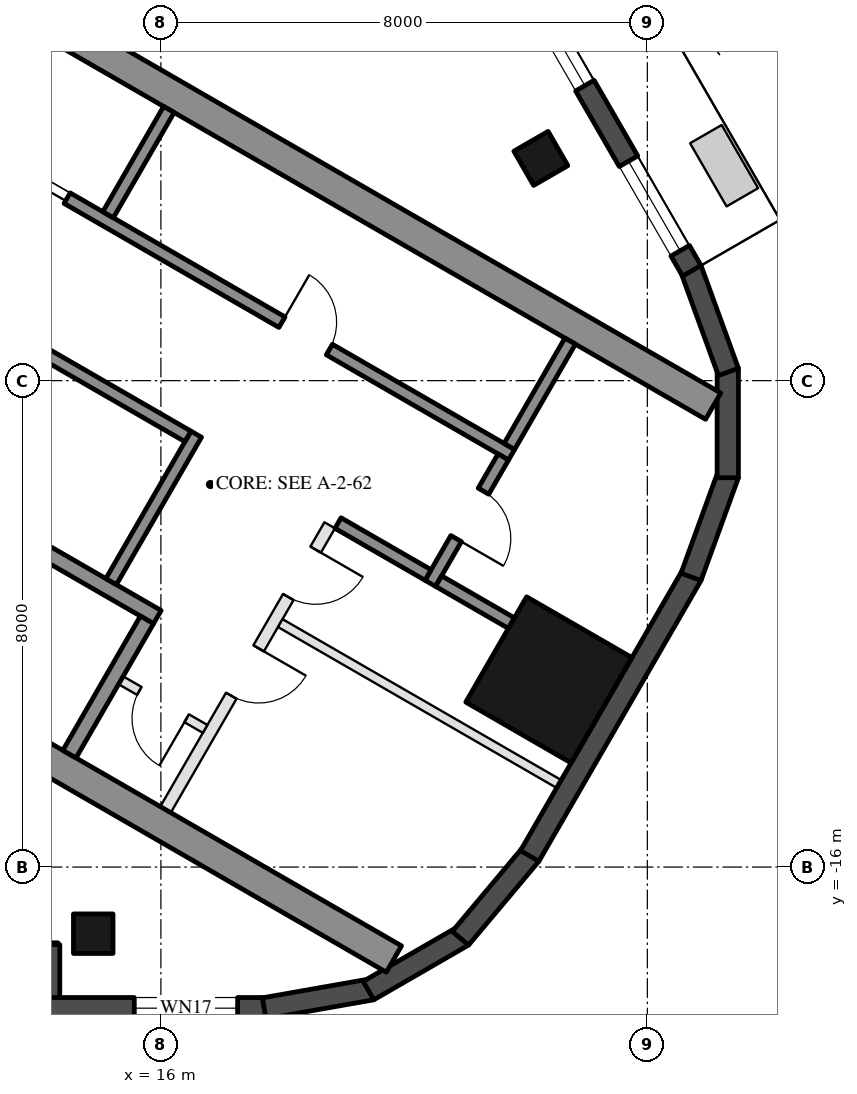
"""IFC4 building model, lengths in metres.
Left out: names, types, materials, properties, quantities, classifications, styles, units other than length and angle.
Written with IfcOpenShell. Run it as: python <this file> out.ifc"""

import sys

from ifc_helpers import new_model, si_unit, direction, frame, frame_2d, origin, origin_2d, place, context, subcontext, project, spatial, rectangle, hollow_rectangle, extrude, boolean, halfspace, element, fill, save


model = new_model("IFC4")
c1 = context("Model", 3, precision=1e-05, world=origin(), true_north=direction((0.0, 1.0)))
c2 = subcontext(c1, "Body", "Model", "MODEL_VIEW")
j1 = project(units=[si_unit("LENGTHUNIT", "METRE"), si_unit("PLANEANGLEUNIT", "RADIAN")], contexts=[c1])
p1 = place(None, origin())
s1 = spatial("IfcSite", under=j1, at=p1, CompositionType="ELEMENT")
p2 = place(p1, origin())
s2 = spatial("IfcBuilding", under=s1, at=p2, CompositionType="ELEMENT")
p3 = place(p2, frame((0.0, 0.0, 268.9)))
s3 = spatial("IfcBuildingStorey", under=s2, at=p3, CompositionType="ELEMENT", Elevation=268.9)
for number, where, z_axis, x_axis in (
    (1, (14.887, -17.096, 0.0), (0.0, 0.0, 1.0), (-1.0, 0.0, 0.0)),
    (2, (22.249, -4.345, 0.0), (0.0, 0.0, 1.0), (-0.5, 0.866, 0.0)),
):
    element("IfcColumn", number, at=place(p3, frame(where, z_axis=z_axis, x_axis=x_axis)), inside=s3, PredefinedType="COLUMN", context=c2, shape_type="SweptSolid", body=[
        boolean("DIFFERENCE", extrude(hollow_rectangle(XDim=0.65, YDim=0.65, WallThickness=0.03, at=origin_2d()), origin(), (0.0, 0.0, 1.0), 3.7), halfspace(frame((0.0, 0.0, 0.047), z_axis=(0.0, 0.0, 1.0), x_axis=(1.0, 0.0, 0.0)), True)),
    ])
p4 = place(p3, frame((22.38, -12.921, 0.0), z_axis=(0.0, 0.0, 1.0), x_axis=(0.5, 0.866025403784, 0.0)))
e3 = element("IfcColumn", 3, at=p4, inside=s3, PredefinedType="COLUMN", context=c2, shape_type="SweptSolid", body=[
    boolean("DIFFERENCE", extrude(hollow_rectangle(XDim=2.0, YDim=2.0, WallThickness=0.05, at=origin_2d()), origin(), (0.0, 0.0, 1.0), 3.7), halfspace(frame((0.0, 0.0, 0.113), z_axis=(0.0, 0.0, 1.0), x_axis=(1.0, 0.0, 0.0)), True)),
])
p5 = place(p3, frame((8.024, -17.421, 0.0), z_axis=(0.0, 0.0, 1.0), x_axis=(1.0, 0.0, 0.0)))
e4 = element("IfcWall", 4, at=p5, inside=s3, PredefinedType="SOLIDWALL", context=c2, shape_type="SweptSolid", body=[
    extrude(rectangle(XDim=6.283, YDim=0.35, at=frame_2d((3.142, 0.0))), origin(), (0.0, 0.0, 1.0), 3.55),
])
p6 = place(p5, frame((3.563, 0.0, 0.0)))
e5 = element("IfcOpeningElement", 5, at=p6, cuts=e4, PredefinedType="OPENING", context=c2, shape_type="SweptSolid", body=[
    extrude(rectangle(XDim=2.4, YDim=2.4, at=frame_2d((1.2, 1.2))), frame((0.0, 0.185, 0.0), z_axis=(0.0, -1.0, 0.0), x_axis=(1.0, 0.0, 0.0)), (0.0, 0.0, 1.0), 0.37),
])
p7 = place(p5, frame((0.77, 0.0, 0.3)))
e6 = element("IfcOpeningElement", 6, at=p7, cuts=e4, PredefinedType="OPENING", context=c2, shape_type="SweptSolid", body=[
    extrude(rectangle(XDim=2.4, YDim=2.65, at=frame_2d((1.2, 1.325))), frame((0.0, 0.185, 0.0), z_axis=(0.0, -1.0, 0.0), x_axis=(1.0, 0.0, 0.0)), (0.0, 0.0, 1.0), 0.37),
])
p8 = place(p3, frame((14.162, -17.276, 0.0), z_axis=(0.0, 0.0, 1.0), x_axis=(0.0, -1.0, 0.0)))
e7 = element("IfcWall", 7, at=p8, inside=s3, PredefinedType="SOLIDWALL", context=c2, shape_type="SweptSolid", body=[
    extrude(rectangle(XDim=1.22, YDim=0.35, at=frame_2d((0.61, 0.0))), origin(), (0.0, 0.0, 1.0), 3.55),
])
p9 = place(p3, frame((13.987, -18.321, 0.0), z_axis=(0.0, 0.0, 1.0), x_axis=(1.0, 0.0, 0.0)))
e8 = element("IfcWall", 8, at=p9, inside=s3, PredefinedType="SOLIDWALL", context=c2, shape_type="SweptSolid", body=[
    extrude(rectangle(XDim=3.742, YDim=0.35, at=frame_2d((1.871, 0.0))), origin(), (0.0, 0.0, 1.0), 3.55),
])
p10 = place(p9, frame((1.575, 0.0, 0.3)))
e9 = element("IfcOpeningElement", 9, at=p10, cuts=e8, PredefinedType="OPENING", context=c2, shape_type="SweptSolid", body=[
    extrude(rectangle(XDim=1.7, YDim=2.65, at=frame_2d((0.85, 1.325))), frame((0.0, 0.185, 0.0), z_axis=(0.0, -1.0, 0.0), x_axis=(1.0, 0.0, 0.0)), (0.0, 0.0, 1.0), 0.37),
])
p11 = place(p3, frame((17.698, -18.323, 0.0), z_axis=(0.0, 0.0, 1.0), x_axis=(0.984810858511, 0.173630564586, 0.0)))
e10 = element("IfcWall", 10, at=p11, inside=s3, PredefinedType="SOLIDWALL", context=c2, shape_type="SweptSolid", body=[
    extrude(rectangle(XDim=1.8, YDim=0.35, at=frame_2d((0.9, 0.0))), origin(), (0.0, 0.0, 1.0), 3.55),
])
p12 = place(p3, frame((19.414, -18.032, 0.0), z_axis=(0.0, 0.0, 1.0), x_axis=(0.866047807691, 0.499961193289, 0.0)))
e11 = element("IfcWall", 11, at=p12, inside=s3, PredefinedType="SOLIDWALL", context=c2, shape_type="SweptSolid", body=[
    extrude(rectangle(XDim=1.8, YDim=0.35, at=frame_2d((0.9, 0.0))), origin(), (0.0, 0.0, 1.0), 3.55),
])
p13 = place(p3, frame((20.926, -17.171, 0.0), z_axis=(0.0, 0.0, 1.0), x_axis=(0.642756114672, 0.766070869471, 0.0)))
e12 = element("IfcWall", 12, at=p13, inside=s3, PredefinedType="SOLIDWALL", context=c2, shape_type="SweptSolid", body=[
    extrude(rectangle(XDim=1.8, YDim=0.35, at=frame_2d((0.9, 0.0))), origin(), (0.0, 0.0, 1.0), 3.55),
])
p14 = place(p3, frame((22.065, -15.817, 0.0), z_axis=(0.0, 0.0, 1.0), x_axis=(0.500025039717, 0.866010946615, 0.0)))
e13 = element("IfcWall", 13, at=p14, inside=s3, PredefinedType="SOLIDWALL", context=c2, shape_type="SweptSolid", body=[
    extrude(rectangle(XDim=5.331, YDim=0.35, at=frame_2d((2.666, 0.0))), origin(), (0.0, 0.0, 1.0), 3.55),
])
p15 = place(p3, frame((24.718, -11.228, 0.0), z_axis=(0.0, 0.0, 1.0), x_axis=(0.34206975284, 0.939674562916, 0.0)))
e14 = element("IfcWall", 14, at=p15, inside=s3, PredefinedType="SOLIDWALL", context=c2, shape_type="SweptSolid", body=[
    extrude(rectangle(XDim=1.8, YDim=0.35, at=frame_2d((0.9, 0.0))), origin(), (0.0, 0.0, 1.0), 3.55),
])
p16 = place(p3, frame((25.323, -9.597, 0.0), z_axis=(0.0, 0.0, 1.0), x_axis=(0.0, 1.0, 0.0)))
e15 = element("IfcWall", 15, at=p16, inside=s3, PredefinedType="SOLIDWALL", context=c2, shape_type="SweptSolid", body=[
    extrude(rectangle(XDim=1.8, YDim=0.35, at=frame_2d((0.9, 0.0))), origin(), (0.0, 0.0, 1.0), 3.55),
])
p17 = place(p3, frame((25.333, -7.857, 0.0), z_axis=(0.0, 0.0, 1.0), x_axis=(-0.34206975284, 0.939674562916, 0.0)))
e16 = element("IfcWall", 16, at=p17, inside=s3, PredefinedType="SOLIDWALL", context=c2, shape_type="SweptSolid", body=[
    extrude(rectangle(XDim=1.8, YDim=0.35, at=frame_2d((0.9, 0.0))), origin(), (0.0, 0.0, 1.0), 3.55),
])
p18 = place(p3, frame((24.731, -6.193, 0.0), z_axis=(0.0, 0.0, 1.0), x_axis=(-0.500007749075, 0.866020929808, 0.0)))
e17 = element("IfcWall", 17, at=p18, inside=s3, PredefinedType="SOLIDWALL", context=c2, shape_type="SweptSolid", body=[
    extrude(rectangle(XDim=11.185, YDim=0.35, at=frame_2d((5.593, 0.0))), origin(), (0.0, 0.0, 1.0), 3.55),
])
p19 = place(p18, frame((0.381, 0.0, 0.3)))
e18 = element("IfcOpeningElement", 18, at=p19, cuts=e17, PredefinedType="OPENING", context=c2, shape_type="SweptSolid", body=[
    extrude(rectangle(XDim=1.7, YDim=2.65, at=frame_2d((0.85, 1.325))), frame((0.0, 0.185, 0.0), z_axis=(0.0, -1.0, 0.0), x_axis=(1.0, 0.0, 0.0)), (0.0, 0.0, 1.0), 0.37),
])
p20 = place(p18, frame((7.21, 0.0, 0.0)))
e19 = element("IfcOpeningElement", 19, at=p20, cuts=e17, PredefinedType="OPENING", context=c2, shape_type="SweptSolid", body=[
    extrude(rectangle(XDim=2.4, YDim=2.4, at=frame_2d((1.2, 1.2))), frame((0.0, 0.185, 0.0), z_axis=(0.0, -1.0, 0.0), x_axis=(1.0, 0.0, 0.0)), (0.0, 0.0, 1.0), 0.37),
])
p21 = place(p18, frame((3.517, 0.0, 0.3)))
e20 = element("IfcOpeningElement", 20, at=p21, cuts=e17, PredefinedType="OPENING", context=c2, shape_type="SweptSolid", body=[
    extrude(rectangle(XDim=1.5, YDim=2.65, at=frame_2d((0.75, 1.325))), frame((0.0, 0.185, 0.0), z_axis=(0.0, -1.0, 0.0), x_axis=(1.0, 0.0, 0.0)), (0.0, 0.0, 1.0), 0.37),
])
p22 = place(p18, frame((5.317, 0.0, 0.3)))
e21 = element("IfcOpeningElement", 21, at=p22, cuts=e17, PredefinedType="OPENING", context=c2, shape_type="SweptSolid", body=[
    extrude(rectangle(XDim=1.5, YDim=2.65, at=frame_2d((0.75, 1.325))), frame((0.0, 0.185, 0.0), z_axis=(0.0, -1.0, 0.0), x_axis=(1.0, 0.0, 0.0)), (0.0, 0.0, 1.0), 0.37),
])
for number, where, z_axis, x_axis in (
    (22, (8.547, -10.997, 0.0), (0.0, 0.0, 1.0), (0.866, -0.5, 0.0)),
    (23, (13.797, -1.903, 0.0), (0.0, 0.0, 1.0), (0.866, -0.5, 0.0)),
):
    element("IfcWall", number, at=place(p3, frame(where, z_axis=z_axis, x_axis=x_axis)), inside=s3, PredefinedType="SHEAR", context=c2, shape_type="SweptSolid", body=[
        extrude(rectangle(XDim=13.031, YDim=0.5, at=frame_2d((6.516, 0.0))), origin(), (0.0, 0.0, 1.0), 3.5),
    ])
p23 = place(p3, frame((10.356, -8.664, 0.0), z_axis=(0.0, 0.0, 1.0), x_axis=(0.866028629588, -0.499994412703, 0.0)))
e24 = element("IfcWall", 24, at=p23, inside=s3, PredefinedType="SHEAR", context=c2, shape_type="SweptSolid", body=[
    extrude(rectangle(XDim=6.45, YDim=0.25, at=frame_2d((3.225, 0.0))), origin(), (0.0, 0.0, 1.0), 3.5),
])
p24 = place(p23, frame((0.3, 0.0, 0.0)))
e25 = element("IfcOpeningElement", 25, at=p24, cuts=e24, PredefinedType="OPENING", context=c2, shape_type="SweptSolid", body=[
    extrude(rectangle(XDim=1.0, YDim=2.1, at=frame_2d((0.5, 1.05))), frame((0.0, 0.135, 0.0), z_axis=(0.0, -1.0, 0.0), x_axis=(1.0, 0.0, 0.0)), (0.0, 0.0, 1.0), 0.27),
])
p25 = place(p3, frame((14.496, -14.143, 0.0), z_axis=(0.0, 0.0, 1.0), x_axis=(0.500062241894, 0.865989465428, 0.0)))
e26 = element("IfcWall", 26, at=p25, inside=s3, PredefinedType="SHEAR", context=c2, shape_type="SweptSolid", body=[
    extrude(rectangle(XDim=2.55, YDim=0.25, at=frame_2d((1.275, 0.0))), origin(), (0.0, 0.0, 1.0), 3.5),
])
p26 = place(p3, frame((15.181, -11.305, 0.0), z_axis=(0.0, 0.0, 1.0), x_axis=(0.49994636267, 0.866056369097, 0.0)))
e27 = element("IfcWall", 27, at=p26, inside=s3, PredefinedType="SHEAR", context=c2, shape_type="SweptSolid", body=[
    extrude(rectangle(XDim=2.8, YDim=0.2, at=frame_2d((1.4, 0.0))), origin(), (0.0, 0.0, 1.0), 3.5),
])
p27 = place(p3, frame((14.02, -7.517, 0.0), z_axis=(0.0, 0.0, 1.0), x_axis=(0.866034573852, -0.49998411664, 0.0)))
e28 = element("IfcWall", 28, at=p27, inside=s3, PredefinedType="SHEAR", context=c2, shape_type="SweptSolid", body=[
    extrude(rectangle(XDim=2.8, YDim=0.2, at=frame_2d((1.4, 0.0))), origin(), (0.0, 0.0, 1.0), 3.5),
])
p28 = place(p3, frame((12.968, -4.138, 0.0), z_axis=(0.0, 0.0, 1.0), x_axis=(0.866028328073, -0.49999493495, 0.0)))
e29 = element("IfcWall", 29, at=p28, inside=s3, PredefinedType="SHEAR", context=c2, shape_type="SweptSolid", body=[
    extrude(rectangle(XDim=10.16, YDim=0.2, at=frame_2d((5.08, 0.0))), origin(), (0.0, 0.0, 1.0), 3.5),
])
p29 = place(p28, frame((0.62, 0.0, 0.0)))
e30 = element("IfcOpeningElement", 30, at=p29, cuts=e29, PredefinedType="OPENING", context=c2, shape_type="SweptSolid", body=[
    extrude(rectangle(XDim=1.1, YDim=2.1, at=frame_2d((0.55, 1.05))), frame((0.0, 0.11, 0.0), z_axis=(0.0, -1.0, 0.0), x_axis=(1.0, 0.0, 0.0)), (0.0, 0.0, 1.0), 0.22),
])
p30 = place(p28, frame((5.8, 0.0, 0.0)))
e31 = element("IfcOpeningElement", 31, at=p30, cuts=e29, PredefinedType="OPENING", context=c2, shape_type="SweptSolid", body=[
    extrude(rectangle(XDim=0.9, YDim=2.1, at=frame_2d((0.45, 1.05))), frame((0.0, 0.11, 0.0), z_axis=(0.0, -1.0, 0.0), x_axis=(1.0, 0.0, 0.0)), (0.0, 0.0, 1.0), 0.22),
])
p31 = place(p3, frame((20.43, -11.333, 0.0), z_axis=(0.0, 0.0, 1.0), x_axis=(0.500001309137, 0.866024647952, 0.0)))
e32 = element("IfcWall", 32, at=p31, inside=s3, PredefinedType="SHEAR", context=c2, shape_type="SweptSolid", body=[
    extrude(rectangle(XDim=2.4, YDim=0.2, at=frame_2d((1.2, 0.0))), origin(), (0.0, 0.0, 1.0), 3.5),
])
p32 = place(p31, frame((0.85, 0.0, 0.0)))
e33 = element("IfcOpeningElement", 33, at=p32, cuts=e32, PredefinedType="OPENING", context=c2, shape_type="SweptSolid", body=[
    extrude(rectangle(XDim=0.9, YDim=2.1, at=frame_2d((0.45, 1.05))), frame((0.0, 0.11, 0.0), z_axis=(0.0, -1.0, 0.0), x_axis=(1.0, 0.0, 0.0)), (0.0, 0.0, 1.0), 0.22),
])
p33 = place(p3, frame((18.913, -10.342, 0.0), z_axis=(0.0, 0.0, 1.0), x_axis=(0.866038183914, -0.499977863513, 0.0)))
e34 = element("IfcWall", 34, at=p33, inside=s3, PredefinedType="SHEAR", context=c2, shape_type="SweptSolid", body=[
    extrude(rectangle(XDim=1.71, YDim=0.2, at=frame_2d((0.855, 0.0))), origin(), (0.0, 0.0, 1.0), 3.5),
])
for number, where, z_axis, x_axis in (
    (35, (15.131, -5.272, 0.0), (0.0, 0.0, 1.0), (0.5, 0.866, 0.0)),
    (36, (21.73, -9.082, 0.0), (0.0, 0.0, 1.0), (0.5, 0.866, 0.0)),
):
    element("IfcWall", number, at=place(p3, frame(where, z_axis=z_axis, x_axis=x_axis)), inside=s3, PredefinedType="SHEAR", context=c2, shape_type="SweptSolid", body=[
        extrude(rectangle(XDim=2.0, YDim=0.2, at=frame_2d((1.0, 0.0))), origin(), (0.0, 0.0, 1.0), 3.5),
    ])
p34 = place(p3, frame((20.567, -11.297, 0.0), z_axis=(0.0, 0.0, 1.0), x_axis=(0.866094443108, -0.499880401313, 0.0)))
e37 = element("IfcWall", 37, at=p34, inside=s3, PredefinedType="SHEAR", context=c2, shape_type="SweptSolid", body=[
    extrude(rectangle(XDim=1.383, YDim=0.2, at=frame_2d((0.691, 0.0))), origin(), (0.0, 0.0, 1.0), 3.5),
])
p35 = place(p3, frame((16.076, -15.055, 0.0), z_axis=(0.0, 0.0, 1.0), x_axis=(0.499995103361, 0.866028230842, 0.0)))
e38 = element("IfcWall", 38, at=p35, inside=s3, PredefinedType="PARTITIONING", context=c2, shape_type="SweptSolid", body=[
    extrude(rectangle(XDim=5.4, YDim=0.2, at=frame_2d((2.7, 0.0))), origin(), (0.0, 0.0, 1.0), 3.5),
])
p36 = place(p35, frame((2.163, 0.0, 0.0)))
e39 = element("IfcOpeningElement", 39, at=p36, cuts=e38, PredefinedType="OPENING", context=c2, shape_type="SweptSolid", body=[
    extrude(rectangle(XDim=0.9, YDim=2.1, at=frame_2d((0.45, 1.05))), frame((0.0, 0.11, 0.0), z_axis=(0.0, -1.0, 0.0), x_axis=(1.0, 0.0, 0.0)), (0.0, 0.0, 1.0), 0.22),
])
p37 = place(p35, frame((4.038, 0.0, 0.0)))
e40 = element("IfcOpeningElement", 40, at=p37, cuts=e38, PredefinedType="OPENING", context=c2, shape_type="SweptSolid", body=[
    extrude(rectangle(XDim=0.9, YDim=2.1, at=frame_2d((0.45, 1.05))), frame((0.0, 0.11, 0.0), z_axis=(0.0, -1.0, 0.0), x_axis=(1.0, 0.0, 0.0)), (0.0, 0.0, 1.0), 0.22),
])
p38 = place(p3, frame((15.342, -12.928, 0.0), z_axis=(0.0, 0.0, 1.0), x_axis=(0.865989903783, -0.500061482766, 0.0)))
e41 = element("IfcWall", 41, at=p38, inside=s3, PredefinedType="PARTITIONING", context=c2, shape_type="SweptSolid", body=[
    extrude(rectangle(XDim=1.6, YDim=0.15, at=frame_2d((0.8, 0.0))), origin(), (0.0, 0.0, 1.0), 3.5),
])
p39 = place(p38, frame((0.35, 0.0, 0.0)))
e42 = element("IfcOpeningElement", 42, at=p39, cuts=e41, PredefinedType="OPENING", context=c2, shape_type="SweptSolid", body=[
    extrude(rectangle(XDim=0.9, YDim=2.1, at=frame_2d((0.45, 1.05))), frame((0.0, 0.085, 0.0), z_axis=(0.0, -1.0, 0.0), x_axis=(1.0, 0.0, 0.0)), (0.0, 0.0, 1.0), 0.17),
])
p40 = place(p3, frame((17.963, -11.987, 0.0), z_axis=(0.0, 0.0, 1.0), x_axis=(0.866008903822, -0.500028577684, 0.0)))
e43 = element("IfcWall", 43, at=p40, inside=s3, PredefinedType="PARTITIONING", context=c2, shape_type="SweptSolid", body=[
    extrude(rectangle(XDim=5.293, YDim=0.15, at=frame_2d((2.646, 0.0))), origin(), (0.0, 0.0, 1.0), 3.5),
])
p41 = place(p10, origin())
e44 = element("IfcWindow", 44, at=p41, inside=s3, PartitioningType="SINGLE_PANEL", PredefinedType="WINDOW", context=c2, shape_type="SweptSolid", body=[
    extrude(rectangle(XDim=1.7, YDim=2.65, at=frame_2d((0.85, 1.325))), frame((0.0, 0.03, 0.0), z_axis=(0.0, -1.0, 0.0), x_axis=(1.0, 0.0, 0.0)), (0.0, 0.0, 1.0), 0.06),
])
fill(e9, e44)
p42 = place(p19, origin())
e45 = element("IfcWindow", 45, at=p42, inside=s3, PartitioningType="SINGLE_PANEL", PredefinedType="WINDOW", context=c2, shape_type="SweptSolid", body=[
    extrude(rectangle(XDim=1.7, YDim=2.65, at=frame_2d((0.85, 1.325))), frame((0.0, 0.03, 0.0), z_axis=(0.0, -1.0, 0.0), x_axis=(1.0, 0.0, 0.0)), (0.0, 0.0, 1.0), 0.06),
])
fill(e18, e45)
p43 = place(p21, origin())
e46 = element("IfcWindow", 46, at=p43, inside=s3, PartitioningType="SINGLE_PANEL", PredefinedType="WINDOW", context=c2, shape_type="SweptSolid", body=[
    extrude(rectangle(XDim=1.5, YDim=2.65, at=frame_2d((0.75, 1.325))), frame((0.0, 0.03, 0.0), z_axis=(0.0, -1.0, 0.0), x_axis=(1.0, 0.0, 0.0)), (0.0, 0.0, 1.0), 0.06),
])
fill(e20, e46)
p44 = place(p39, frame((0.9, 0.0, 0.0), z_axis=(0.0, 0.0, 1.0), x_axis=(-1.0, 0.0, 0.0)))
e47 = element("IfcDoor", 47, at=p44, inside=s3, OperationType="SINGLE_SWING_LEFT", PredefinedType="DOOR", context=c2, shape_type="SweptSolid", body=[
    extrude(rectangle(XDim=0.9, YDim=2.1, at=frame_2d((0.45, 1.05))), frame((0.0, 0.025, 0.0), z_axis=(0.0, -1.0, 0.0), x_axis=(1.0, 0.0, 0.0)), (0.0, 0.0, 1.0), 0.05),
])
fill(e42, e47)
p45 = place(p29, origin())
e48 = element("IfcDoor", 48, at=p45, inside=s3, OperationType="DOUBLE_DOOR_SLIDING", PredefinedType="DOOR", context=c2, shape_type="SweptSolid", body=[
    extrude(rectangle(XDim=1.1, YDim=2.1, at=frame_2d((0.55, 1.05))), frame((0.0, 0.025, 0.0), z_axis=(0.0, -1.0, 0.0), x_axis=(1.0, 0.0, 0.0)), (0.0, 0.0, 1.0), 0.05),
])
fill(e30, e48)
p46 = place(p30, origin())
e49 = element("IfcDoor", 49, at=p46, inside=s3, OperationType="SINGLE_SWING_LEFT", PredefinedType="DOOR", context=c2, shape_type="SweptSolid", body=[
    extrude(rectangle(XDim=0.9, YDim=2.1, at=frame_2d((0.45, 1.05))), frame((0.0, 0.025, 0.0), z_axis=(0.0, -1.0, 0.0), x_axis=(1.0, 0.0, 0.0)), (0.0, 0.0, 1.0), 0.05),
])
fill(e31, e49)
p47 = place(p32, frame((0.9, 0.0, 0.0), z_axis=(0.0, 0.0, 1.0), x_axis=(-1.0, 0.0, 0.0)))
e50 = element("IfcDoor", 50, at=p47, inside=s3, OperationType="SINGLE_SWING_RIGHT", PredefinedType="DOOR", context=c2, shape_type="SweptSolid", body=[
    extrude(rectangle(XDim=0.9, YDim=2.1, at=frame_2d((0.45, 1.05))), frame((0.0, 0.025, 0.0), z_axis=(0.0, -1.0, 0.0), x_axis=(1.0, 0.0, 0.0)), (0.0, 0.0, 1.0), 0.05),
])
fill(e33, e50)
p48 = place(p36, frame((0.9, 0.0, 0.0), z_axis=(0.0, 0.0, 1.0), x_axis=(-1.0, 0.0, 0.0)))
e51 = element("IfcDoor", 51, at=p48, inside=s3, OperationType="SINGLE_SWING_LEFT", PredefinedType="DOOR", context=c2, shape_type="SweptSolid", body=[
    extrude(rectangle(XDim=0.9, YDim=2.1, at=frame_2d((0.45, 1.05))), frame((0.0, 0.025, 0.0), z_axis=(0.0, -1.0, 0.0), x_axis=(1.0, 0.0, 0.0)), (0.0, 0.0, 1.0), 0.05),
])
fill(e39, e51)
p49 = place(p37, frame((0.9, 0.0, 0.0), z_axis=(0.0, 0.0, 1.0), x_axis=(-1.0, 0.0, 0.0)))
e52 = element("IfcDoor", 52, at=p49, inside=s3, OperationType="SINGLE_SWING_LEFT", PredefinedType="DOOR", context=c2, shape_type="SweptSolid", body=[
    extrude(rectangle(XDim=0.9, YDim=2.1, at=frame_2d((0.45, 1.05))), frame((0.0, 0.025, 0.0), z_axis=(0.0, -1.0, 0.0), x_axis=(1.0, 0.0, 0.0)), (0.0, 0.0, 1.0), 0.05),
])
fill(e40, e52)
save(model, sys.argv[1])
